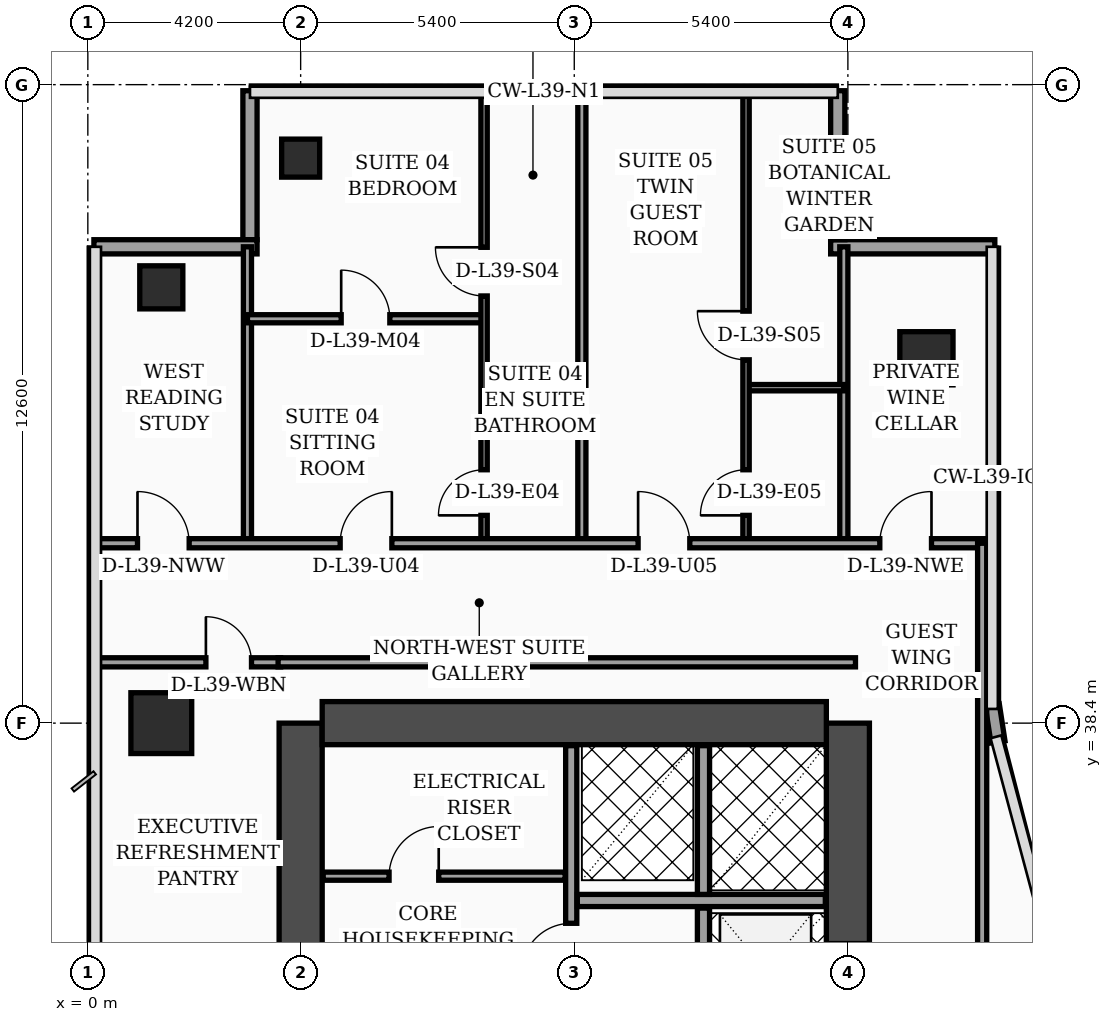
"""IFC4 building model, lengths in metres.
Left out: names, types, materials, properties, quantities, classifications, styles, units other than length and angle.
Written with IfcOpenShell. Run it as: python <this file> out.ifc"""

import sys

from ifc_helpers import new_model, si_unit, direction, frame, frame_2d, origin, origin_2d, place, context, subcontext, project, spatial, rectangle, hollow_rectangle, extrude, element, fill, save


model = new_model("IFC4")
c1 = context("Model", 3, precision=1e-05, world=origin(), true_north=direction((0.0, 1.0)))
c2 = subcontext(c1, "Body", "Model", "MODEL_VIEW")
j1 = project(units=[si_unit("LENGTHUNIT", "METRE"), si_unit("PLANEANGLEUNIT", "RADIAN")], contexts=[c1])
p1 = place(None, origin())
s1 = spatial("IfcSite", under=j1, at=p1, CompositionType="ELEMENT")
p2 = place(p1, origin())
s2 = spatial("IfcBuilding", under=s1, at=p2, CompositionType="ELEMENT")
p3 = place(p2, frame((0.0, 0.0, 159.9)))
s3 = spatial("IfcBuildingStorey", under=s2, at=p3, CompositionType="ELEMENT", Elevation=159.9)
p4 = place(p3, frame((4.2, 16.8, 0.0), z_axis=(0.0, 0.0, 1.0), x_axis=(0.0, 1.0, 0.0)))
e1 = element("IfcWall", 1, at=p4, inside=s3, PredefinedType="SHEAR", context=c2, shape_type="SweptSolid", body=[
    extrude(rectangle(XDim=21.6, YDim=0.85, at=frame_2d((10.8, 0.0))), origin(), (0.0, 0.0, 1.0), 3.56),
])
p5 = place(p3, frame((15.0, 16.8, 0.0), z_axis=(0.0, 0.0, 1.0), x_axis=(0.0, 1.0, 0.0)))
e2 = element("IfcWall", 2, at=p5, inside=s3, PredefinedType="SHEAR", context=c2, shape_type="SweptSolid", body=[
    extrude(rectangle(XDim=21.6, YDim=0.85, at=frame_2d((10.8, 0.0))), origin(), (0.0, 0.0, 1.0), 3.56),
])
p6 = place(p5, frame((8.65, 0.0, 0.0)))
e3 = element("IfcOpeningElement", 3, at=p6, cuts=e2, PredefinedType="OPENING", context=c2, shape_type="SweptSolid", body=[
    extrude(rectangle(XDim=1.1, YDim=2.2, at=frame_2d((0.55, 1.1))), frame((0.0, 0.435, 0.0), z_axis=(0.0, -1.0, 0.0), x_axis=(1.0, 0.0, 0.0)), (0.0, 0.0, 1.0), 0.87),
])
p7 = place(p5, frame((10.85, 0.0, 0.0)))
e4 = element("IfcOpeningElement", 4, at=p7, cuts=e2, PredefinedType="OPENING", context=c2, shape_type="SweptSolid", body=[
    extrude(rectangle(XDim=1.1, YDim=2.2, at=frame_2d((0.55, 1.1))), frame((0.0, 0.435, 0.0), z_axis=(0.0, -1.0, 0.0), x_axis=(1.0, 0.0, 0.0)), (0.0, 0.0, 1.0), 0.87),
])
p8 = place(p5, frame((13.5, 0.0, 0.0)))
e5 = element("IfcOpeningElement", 5, at=p8, cuts=e2, PredefinedType="OPENING", context=c2, shape_type="SweptSolid", body=[
    extrude(rectangle(XDim=1.1, YDim=2.2, at=frame_2d((0.55, 1.1))), frame((0.0, 0.435, 0.0), z_axis=(0.0, -1.0, 0.0), x_axis=(1.0, 0.0, 0.0)), (0.0, 0.0, 1.0), 0.87),
])
p9 = place(p5, frame((16.15, 0.0, 0.0)))
e6 = element("IfcOpeningElement", 6, at=p9, cuts=e2, PredefinedType="OPENING", context=c2, shape_type="SweptSolid", body=[
    extrude(rectangle(XDim=1.1, YDim=2.2, at=frame_2d((0.55, 1.1))), frame((0.0, 0.435, 0.0), z_axis=(0.0, -1.0, 0.0), x_axis=(1.0, 0.0, 0.0)), (0.0, 0.0, 1.0), 0.87),
])
p10 = place(p3, frame((4.625, 38.4, 0.0), z_axis=(0.0, 0.0, 1.0), x_axis=(1.0, 0.0, 0.0)))
e7 = element("IfcWall", 7, at=p10, inside=s3, PredefinedType="SHEAR", context=c2, shape_type="SweptSolid", body=[
    extrude(rectangle(XDim=9.95, YDim=0.85, at=frame_2d((4.975, 0.0))), origin(), (0.0, 0.0, 1.0), 3.56),
])
p11 = place(p3, frame((1.45, 38.4, 0.0), z_axis=(0.0, 0.0, 1.0), x_axis=(1.0, 0.0, 0.0)))
e8 = element("IfcColumn", 8, at=p11, inside=s3, PredefinedType="COLUMN", context=c2, shape_type="SweptSolid", body=[
    extrude(rectangle(XDim=1.2, YDim=1.2, at=origin_2d()), origin(), (0.0, 0.0, 1.0), 3.56),
])
p12 = place(p3, frame((1.45, 47.0, 0.0), z_axis=(0.0, 0.0, 1.0), x_axis=(1.0, 0.0, 0.0)))
e9 = element("IfcColumn", 9, at=p12, inside=s3, PredefinedType="COLUMN", context=c2, shape_type="SweptSolid", body=[
    extrude(hollow_rectangle(XDim=0.85, YDim=0.85, WallThickness=0.036, at=origin_2d()), origin(), (0.0, 0.0, 1.0), 3.56),
])
p13 = place(p3, frame((4.2, 49.55, 0.0), z_axis=(0.0, 0.0, 1.0), x_axis=(1.0, 0.0, 0.0)))
e10 = element("IfcColumn", 10, at=p13, inside=s3, PredefinedType="COLUMN", context=c2, shape_type="SweptSolid", body=[
    extrude(hollow_rectangle(XDim=0.75, YDim=0.75, WallThickness=0.032, at=origin_2d()), origin(), (0.0, 0.0, 1.0), 3.56),
])
p14 = place(p3, frame((16.55, 45.6, 0.0), z_axis=(0.0, 0.0, 1.0), x_axis=(1.0, 0.0, 0.0)))
e11 = element("IfcColumn", 11, at=p14, inside=s3, PredefinedType="COLUMN", context=c2, shape_type="SweptSolid", body=[
    extrude(rectangle(XDim=1.05, YDim=1.05, at=origin_2d()), origin(), (0.0, 0.0, 1.0), 3.56),
])
p15 = place(p3, frame((17.962, 38.03, 0.0), z_axis=(0.0, 0.0, 1.0), x_axis=(-0.15141125477, 0.988470855377, 0.0)))
e12 = element("IfcWall", 12, at=p15, inside=s3, PredefinedType="SOLIDWALL", context=c2, shape_type="SweptSolid", body=[
    extrude(rectangle(XDim=0.739, YDim=0.28, at=frame_2d((0.369, 0.0))), origin(), (0.0, 0.0, 1.0), 3.56),
])
p16 = place(p3, frame((17.9, 47.8, 0.0), z_axis=(0.0, 0.0, 1.0), x_axis=(-1.0, 0.0, 0.0)))
e13 = element("IfcWall", 13, at=p16, inside=s3, PredefinedType="SOLIDWALL", context=c2, shape_type="SweptSolid", body=[
    extrude(rectangle(XDim=3.24, YDim=0.28, at=frame_2d((1.62, 0.0))), origin(), (0.0, 0.0, 1.0), 3.56),
])
p17 = place(p3, frame((14.8, 47.94, 0.0), z_axis=(0.0, 0.0, 1.0), x_axis=(0.0, 1.0, 0.0)))
e14 = element("IfcWall", 14, at=p17, inside=s3, PredefinedType="SOLIDWALL", context=c2, shape_type="SweptSolid", body=[
    extrude(rectangle(XDim=2.94, YDim=0.28, at=frame_2d((1.47, 0.0))), origin(), (0.0, 0.0, 1.0), 3.56),
])
p18 = place(p3, frame((3.2, 50.88, 0.0), z_axis=(0.0, 0.0, 1.0), x_axis=(0.0, -1.0, 0.0)))
e15 = element("IfcWall", 15, at=p18, inside=s3, PredefinedType="SOLIDWALL", context=c2, shape_type="SweptSolid", body=[
    extrude(rectangle(XDim=2.94, YDim=0.28, at=frame_2d((1.47, 0.0))), origin(), (0.0, 0.0, 1.0), 3.04),
])
p19 = place(p3, frame((3.34, 47.8, 0.0), z_axis=(0.0, 0.0, 1.0), x_axis=(-1.0, 0.0, 0.0)))
e16 = element("IfcWall", 16, at=p19, inside=s3, PredefinedType="SOLIDWALL", context=c2, shape_type="SweptSolid", body=[
    extrude(rectangle(XDim=3.22, YDim=0.28, at=frame_2d((1.61, 0.0))), origin(), (0.0, 0.0, 1.0), 3.04),
])
p20 = place(p3, frame((4.645, 35.38, 0.0), z_axis=(0.0, 0.0, 1.0), x_axis=(1.0, 0.0, 0.0)))
e17 = element("IfcWall", 17, at=p20, inside=s3, PredefinedType="PARTITIONING", context=c2, shape_type="SweptSolid", body=[
    extrude(rectangle(XDim=4.775, YDim=0.16, at=frame_2d((2.387, 0.0))), origin(), (0.0, 0.0, 1.0), 3.56),
])
p21 = place(p20, frame((1.3, 0.0, 0.0)))
e18 = element("IfcOpeningElement", 18, at=p21, cuts=e17, PredefinedType="OPENING", context=c2, shape_type="SweptSolid", body=[
    extrude(rectangle(XDim=0.98, YDim=2.15, at=frame_2d((0.49, 1.075))), frame((0.0, 0.09, 0.0), z_axis=(0.0, -1.0, 0.0), x_axis=(1.0, 0.0, 0.0)), (0.0, 0.0, 1.0), 0.18),
])
p22 = place(p3, frame((9.54, 32.92, 0.0), z_axis=(0.0, 0.0, 1.0), x_axis=(0.0, 1.0, 0.0)))
e19 = element("IfcWall", 19, at=p22, inside=s3, PredefinedType="SOLIDWALL", context=c2, shape_type="SweptSolid", body=[
    extrude(rectangle(XDim=5.035, YDim=0.22, at=frame_2d((2.518, 0.0))), origin(), (0.0, 0.0, 1.0), 3.56),
])
p23 = place(p22, frame((0.55, 0.0, 0.0)))
e20 = element("IfcOpeningElement", 20, at=p23, cuts=e19, PredefinedType="OPENING", context=c2, shape_type="SweptSolid", body=[
    extrude(rectangle(XDim=0.98, YDim=2.15, at=frame_2d((0.49, 1.075))), frame((0.0, 0.12, 0.0), z_axis=(0.0, -1.0, 0.0), x_axis=(1.0, 0.0, 0.0)), (0.0, 0.0, 1.0), 0.24),
])
p24 = place(p3, frame((12.15, 27.0, 0.0), z_axis=(0.0, 0.0, 1.0), x_axis=(0.0, 1.0, 0.0)))
e21 = element("IfcWall", 21, at=p24, inside=s3, PredefinedType="SOLIDWALL", context=c2, shape_type="SweptSolid", body=[
    extrude(rectangle(XDim=7.75, YDim=0.24, at=frame_2d((3.875, 0.0))), origin(), (0.0, 0.0, 1.0), 3.56),
])
p25 = place(p3, frame((9.66, 34.9, 0.0), z_axis=(0.0, 0.0, 1.0), x_axis=(1.0, 0.0, 0.0)))
e22 = element("IfcWall", 22, at=p25, inside=s3, PredefinedType="SOLIDWALL", context=c2, shape_type="SweptSolid", body=[
    extrude(rectangle(XDim=4.895, YDim=0.24, at=frame_2d((2.448, 0.0))), origin(), (0.0, 0.0, 1.0), 3.56),
])
p26 = place(p3, frame((12.15, 35.02, 0.0), z_axis=(0.0, 0.0, 1.0), x_axis=(0.0, 1.0, 0.0)))
e23 = element("IfcWall", 23, at=p26, inside=s3, PredefinedType="SOLIDWALL", context=c2, shape_type="SweptSolid", body=[
    extrude(rectangle(XDim=2.935, YDim=0.24, at=frame_2d((1.468, 0.0))), origin(), (0.0, 0.0, 1.0), 3.56),
])
p27 = place(p3, frame((0.08, 39.6, 0.0), z_axis=(0.0, 0.0, 1.0), x_axis=(1.0, 0.0, 0.0)))
e24 = element("IfcWall", 24, at=p27, inside=s3, PredefinedType="PARTITIONING", context=c2, shape_type="SweptSolid", body=[
    extrude(rectangle(XDim=3.725, YDim=0.18, at=frame_2d((1.862, 0.0))), origin(), (0.0, 0.0, 1.0), 2.94),
])
p28 = place(p27, frame((2.25, 0.0, 0.0)))
e25 = element("IfcOpeningElement", 25, at=p28, cuts=e24, PredefinedType="OPENING", context=c2, shape_type="SweptSolid", body=[
    extrude(rectangle(XDim=0.9, YDim=2.15, at=frame_2d((0.45, 1.075))), frame((0.0, 0.1, 0.0), z_axis=(0.0, -1.0, 0.0), x_axis=(1.0, 0.0, 0.0)), (0.0, 0.0, 1.0), 0.2),
])
p29 = place(p3, frame((3.15, 41.95, 0.0), z_axis=(0.0, 0.0, 1.0), x_axis=(0.0, 1.0, 0.0)))
e26 = element("IfcWall", 26, at=p29, inside=s3, PredefinedType="PARTITIONING", context=c2, shape_type="SweptSolid", body=[
    extrude(rectangle(XDim=5.85, YDim=0.16, at=frame_2d((2.925, 0.0))), origin(), (0.0, 0.0, 1.0), 3.14),
])
p30 = place(p3, frame((14.92, 41.95, 0.0), z_axis=(0.0, 0.0, 1.0), x_axis=(0.0, 1.0, 0.0)))
e27 = element("IfcWall", 27, at=p30, inside=s3, PredefinedType="PARTITIONING", context=c2, shape_type="SweptSolid", body=[
    extrude(rectangle(XDim=5.85, YDim=0.16, at=frame_2d((2.925, 0.0))), origin(), (0.0, 0.0, 1.0), 3.04),
])
p31 = place(p3, frame((7.82, 45.02, 0.0), z_axis=(0.0, 0.0, 1.0), x_axis=(1.0, 0.0, 0.0)))
e28 = element("IfcWall", 28, at=p31, inside=s3, PredefinedType="PARTITIONING", context=c2, shape_type="SweptSolid", body=[
    extrude(rectangle(XDim=1.93, YDim=0.125, at=frame_2d((0.965, 0.0))), origin(), (0.0, 0.0, 1.0), 3.56),
])
p32 = place(p3, frame((3.15, 46.38, 0.0), z_axis=(0.0, 0.0, 1.0), x_axis=(1.0, 0.0, 0.0)))
e29 = element("IfcWall", 29, at=p32, inside=s3, PredefinedType="PARTITIONING", context=c2, shape_type="SweptSolid", body=[
    extrude(rectangle(XDim=4.67, YDim=0.16, at=frame_2d((2.335, 0.0))), origin(), (0.0, 0.0, 1.0), 2.94),
])
p33 = place(p32, frame((1.85, 0.0, 0.0)))
e30 = element("IfcOpeningElement", 30, at=p33, cuts=e29, PredefinedType="OPENING", context=c2, shape_type="SweptSolid", body=[
    extrude(rectangle(XDim=0.96, YDim=2.2, at=frame_2d((0.48, 1.1))), frame((0.0, 0.09, 0.0), z_axis=(0.0, -1.0, 0.0), x_axis=(1.0, 0.0, 0.0)), (0.0, 0.0, 1.0), 0.18),
])
p34 = place(p3, frame((7.82, 41.95, 0.0), z_axis=(0.0, 0.0, 1.0), x_axis=(0.0, 1.0, 0.0)))
e31 = element("IfcWall", 31, at=p34, inside=s3, PredefinedType="PARTITIONING", context=c2, shape_type="SweptSolid", body=[
    extrude(rectangle(XDim=8.99, YDim=0.125, at=frame_2d((4.495, 0.0))), origin(), (0.0, 0.0, 1.0), 3.04),
])
p35 = place(p34, frame((0.55, 0.0, 0.0)))
e32 = element("IfcOpeningElement", 32, at=p35, cuts=e31, PredefinedType="OPENING", context=c2, shape_type="SweptSolid", body=[
    extrude(rectangle(XDim=0.9, YDim=2.15, at=frame_2d((0.45, 1.075))), frame((0.0, 0.073, 0.0), z_axis=(0.0, -1.0, 0.0), x_axis=(1.0, 0.0, 0.0)), (0.0, 0.0, 1.0), 0.145),
])
p36 = place(p34, frame((4.88, 0.0, 0.0)))
e33 = element("IfcOpeningElement", 33, at=p36, cuts=e31, PredefinedType="OPENING", context=c2, shape_type="SweptSolid", body=[
    extrude(rectangle(XDim=0.96, YDim=2.2, at=frame_2d((0.48, 1.1))), frame((0.0, 0.073, 0.0), z_axis=(0.0, -1.0, 0.0), x_axis=(1.0, 0.0, 0.0)), (0.0, 0.0, 1.0), 0.145),
])
p37 = place(p3, frame((12.99, 45.02, 0.0), z_axis=(0.0, 0.0, 1.0), x_axis=(1.0, 0.0, 0.0)))
e34 = element("IfcWall", 34, at=p37, inside=s3, PredefinedType="PARTITIONING", context=c2, shape_type="SweptSolid", body=[
    extrude(rectangle(XDim=1.93, YDim=0.125, at=frame_2d((0.965, 0.0))), origin(), (0.0, 0.0, 1.0), 3.56),
])
p38 = place(p3, frame((12.99, 41.95, 0.0), z_axis=(0.0, 0.0, 1.0), x_axis=(0.0, 1.0, 0.0)))
e35 = element("IfcWall", 35, at=p38, inside=s3, PredefinedType="PARTITIONING", context=c2, shape_type="SweptSolid", body=[
    extrude(rectangle(XDim=8.99, YDim=0.125, at=frame_2d((4.495, 0.0))), origin(), (0.0, 0.0, 1.0), 3.04),
])
p39 = place(p38, frame((0.55, 0.0, 0.0)))
e36 = element("IfcOpeningElement", 36, at=p39, cuts=e35, PredefinedType="OPENING", context=c2, shape_type="SweptSolid", body=[
    extrude(rectangle(XDim=0.9, YDim=2.15, at=frame_2d((0.45, 1.075))), frame((0.0, 0.073, 0.0), z_axis=(0.0, -1.0, 0.0), x_axis=(1.0, 0.0, 0.0)), (0.0, 0.0, 1.0), 0.145),
])
p40 = place(p38, frame((3.62, 0.0, 0.0)))
e37 = element("IfcOpeningElement", 37, at=p40, cuts=e35, PredefinedType="OPENING", context=c2, shape_type="SweptSolid", body=[
    extrude(rectangle(XDim=0.96, YDim=2.2, at=frame_2d((0.48, 1.1))), frame((0.0, 0.073, 0.0), z_axis=(0.0, -1.0, 0.0), x_axis=(1.0, 0.0, 0.0)), (0.0, 0.0, 1.0), 0.145),
])
p41 = place(p3, frame((9.75, 41.95, 0.0), z_axis=(0.0, 0.0, 1.0), x_axis=(0.0, 1.0, 0.0)))
e38 = element("IfcWall", 38, at=p41, inside=s3, PredefinedType="PARTITIONING", context=c2, shape_type="SweptSolid", body=[
    extrude(rectangle(XDim=8.99, YDim=0.16, at=frame_2d((4.495, 0.0))), origin(), (0.0, 0.0, 1.0), 3.04),
])
p42 = place(p3, frame((0.08, 41.95, 0.0), z_axis=(0.0, 0.0, 1.0), x_axis=(1.0, 0.0, 0.0)))
e39 = element("IfcWall", 39, at=p42, inside=s3, PredefinedType="PARTITIONING", context=c2, shape_type="SweptSolid", body=[
    extrude(rectangle(XDim=17.77, YDim=0.18, at=frame_2d((8.885, 0.0))), origin(), (0.0, 0.0, 1.0), 2.94),
])
p43 = place(p42, frame((0.9, 0.0, 0.0)))
e40 = element("IfcOpeningElement", 40, at=p43, cuts=e39, PredefinedType="OPENING", context=c2, shape_type="SweptSolid", body=[
    extrude(rectangle(XDim=1.02, YDim=2.2, at=frame_2d((0.51, 1.1))), frame((0.0, 0.1, 0.0), z_axis=(0.0, -1.0, 0.0), x_axis=(1.0, 0.0, 0.0)), (0.0, 0.0, 1.0), 0.2),
])
p44 = place(p42, frame((4.9, 0.0, 0.0)))
e41 = element("IfcOpeningElement", 41, at=p44, cuts=e39, PredefinedType="OPENING", context=c2, shape_type="SweptSolid", body=[
    extrude(rectangle(XDim=1.02, YDim=2.2, at=frame_2d((0.51, 1.1))), frame((0.0, 0.1, 0.0), z_axis=(0.0, -1.0, 0.0), x_axis=(1.0, 0.0, 0.0)), (0.0, 0.0, 1.0), 0.2),
])
p45 = place(p42, frame((10.78, 0.0, 0.0)))
e42 = element("IfcOpeningElement", 42, at=p45, cuts=e39, PredefinedType="OPENING", context=c2, shape_type="SweptSolid", body=[
    extrude(rectangle(XDim=1.02, YDim=2.2, at=frame_2d((0.51, 1.1))), frame((0.0, 0.1, 0.0), z_axis=(0.0, -1.0, 0.0), x_axis=(1.0, 0.0, 0.0)), (0.0, 0.0, 1.0), 0.2),
])
p46 = place(p42, frame((15.55, 0.0, 0.0)))
e43 = element("IfcOpeningElement", 43, at=p46, cuts=e39, PredefinedType="OPENING", context=c2, shape_type="SweptSolid", body=[
    extrude(rectangle(XDim=1.02, YDim=2.2, at=frame_2d((0.51, 1.1))), frame((0.0, 0.1, 0.0), z_axis=(0.0, -1.0, 0.0), x_axis=(1.0, 0.0, 0.0)), (0.0, 0.0, 1.0), 0.2),
])
p47 = place(p3, frame((17.65, 24.3, 0.0), z_axis=(0.0, 0.0, 1.0), x_axis=(0.0, 1.0, 0.0)))
e44 = element("IfcWall", 44, at=p47, inside=s3, PredefinedType="PARTITIONING", context=c2, shape_type="SweptSolid", body=[
    extrude(rectangle(XDim=17.65, YDim=0.18, at=frame_2d((8.825, 0.0))), origin(), (0.0, 0.0, 1.0), 2.94),
])
p48 = place(p3, frame((3.755, 39.6, 0.0), z_axis=(0.0, 0.0, 1.0), x_axis=(1.0, 0.0, 0.0)))
e45 = element("IfcWall", 45, at=p48, inside=s3, PredefinedType="PARTITIONING", context=c2, shape_type="SweptSolid", body=[
    extrude(rectangle(XDim=11.395, YDim=0.18, at=frame_2d((5.698, 0.0))), origin(), (0.0, 0.0, 1.0), 2.94),
])
p49 = place(p21, origin())
e46 = element("IfcDoor", 46, at=p49, inside=s3, OperationType="SINGLE_SWING_RIGHT", PredefinedType="DOOR", context=c2, shape_type="SweptSolid", body=[
    extrude(rectangle(XDim=0.98, YDim=2.15, at=frame_2d((0.49, 1.075))), frame((0.0, 0.025, 0.0), z_axis=(0.0, -1.0, 0.0), x_axis=(1.0, 0.0, 0.0)), (0.0, 0.0, 1.0), 0.05),
])
fill(e18, e46)
p50 = place(p23, origin())
e47 = element("IfcDoor", 47, at=p50, inside=s3, OperationType="SINGLE_SWING_LEFT", PredefinedType="DOOR", context=c2, shape_type="SweptSolid", body=[
    extrude(rectangle(XDim=0.98, YDim=2.15, at=frame_2d((0.49, 1.075))), frame((0.0, 0.025, 0.0), z_axis=(0.0, -1.0, 0.0), x_axis=(1.0, 0.0, 0.0)), (0.0, 0.0, 1.0), 0.05),
])
fill(e20, e47)
p51 = place(p28, origin())
e48 = element("IfcDoor", 48, at=p51, inside=s3, OperationType="SINGLE_SWING_LEFT", PredefinedType="DOOR", context=c2, shape_type="SweptSolid", body=[
    extrude(rectangle(XDim=0.9, YDim=2.15, at=frame_2d((0.45, 1.075))), frame((0.0, 0.025, 0.0), z_axis=(0.0, -1.0, 0.0), x_axis=(1.0, 0.0, 0.0)), (0.0, 0.0, 1.0), 0.05),
])
fill(e25, e48)
p52 = place(p33, origin())
e49 = element("IfcDoor", 49, at=p52, inside=s3, OperationType="SINGLE_SWING_LEFT", PredefinedType="DOOR", context=c2, shape_type="SweptSolid", body=[
    extrude(rectangle(XDim=0.96, YDim=2.2, at=frame_2d((0.48, 1.1))), frame((0.0, 0.025, 0.0), z_axis=(0.0, -1.0, 0.0), x_axis=(1.0, 0.0, 0.0)), (0.0, 0.0, 1.0), 0.05),
])
fill(e30, e49)
p53 = place(p35, origin())
e50 = element("IfcDoor", 50, at=p53, inside=s3, OperationType="SINGLE_SWING_LEFT", PredefinedType="DOOR", context=c2, shape_type="SweptSolid", body=[
    extrude(rectangle(XDim=0.9, YDim=2.15, at=frame_2d((0.45, 1.075))), frame((0.0, 0.025, 0.0), z_axis=(0.0, -1.0, 0.0), x_axis=(1.0, 0.0, 0.0)), (0.0, 0.0, 1.0), 0.05),
])
fill(e32, e50)
p54 = place(p36, origin())
e51 = element("IfcDoor", 51, at=p54, inside=s3, OperationType="SINGLE_SWING_RIGHT", PredefinedType="DOOR", context=c2, shape_type="SweptSolid", body=[
    extrude(rectangle(XDim=0.96, YDim=2.2, at=frame_2d((0.48, 1.1))), frame((0.0, 0.025, 0.0), z_axis=(0.0, -1.0, 0.0), x_axis=(1.0, 0.0, 0.0)), (0.0, 0.0, 1.0), 0.05),
])
fill(e33, e51)
p55 = place(p39, origin())
e52 = element("IfcDoor", 52, at=p55, inside=s3, OperationType="SINGLE_SWING_LEFT", PredefinedType="DOOR", context=c2, shape_type="SweptSolid", body=[
    extrude(rectangle(XDim=0.9, YDim=2.15, at=frame_2d((0.45, 1.075))), frame((0.0, 0.025, 0.0), z_axis=(0.0, -1.0, 0.0), x_axis=(1.0, 0.0, 0.0)), (0.0, 0.0, 1.0), 0.05),
])
fill(e36, e52)
p56 = place(p40, origin())
e53 = element("IfcDoor", 53, at=p56, inside=s3, OperationType="SINGLE_SWING_RIGHT", PredefinedType="DOOR", context=c2, shape_type="SweptSolid", body=[
    extrude(rectangle(XDim=0.96, YDim=2.2, at=frame_2d((0.48, 1.1))), frame((0.0, 0.025, 0.0), z_axis=(0.0, -1.0, 0.0), x_axis=(1.0, 0.0, 0.0)), (0.0, 0.0, 1.0), 0.05),
])
fill(e37, e53)
p57 = place(p43, origin())
e54 = element("IfcDoor", 54, at=p57, inside=s3, OperationType="SINGLE_SWING_LEFT", PredefinedType="DOOR", context=c2, shape_type="SweptSolid", body=[
    extrude(rectangle(XDim=1.02, YDim=2.2, at=frame_2d((0.51, 1.1))), frame((0.0, 0.025, 0.0), z_axis=(0.0, -1.0, 0.0), x_axis=(1.0, 0.0, 0.0)), (0.0, 0.0, 1.0), 0.05),
])
fill(e40, e54)
p58 = place(p44, origin())
e55 = element("IfcDoor", 55, at=p58, inside=s3, OperationType="SINGLE_SWING_RIGHT", PredefinedType="DOOR", context=c2, shape_type="SweptSolid", body=[
    extrude(rectangle(XDim=1.02, YDim=2.2, at=frame_2d((0.51, 1.1))), frame((0.0, 0.025, 0.0), z_axis=(0.0, -1.0, 0.0), x_axis=(1.0, 0.0, 0.0)), (0.0, 0.0, 1.0), 0.05),
])
fill(e41, e55)
p59 = place(p45, origin())
e56 = element("IfcDoor", 56, at=p59, inside=s3, OperationType="SINGLE_SWING_LEFT", PredefinedType="DOOR", context=c2, shape_type="SweptSolid", body=[
    extrude(rectangle(XDim=1.02, YDim=2.2, at=frame_2d((0.51, 1.1))), frame((0.0, 0.025, 0.0), z_axis=(0.0, -1.0, 0.0), x_axis=(1.0, 0.0, 0.0)), (0.0, 0.0, 1.0), 0.05),
])
fill(e42, e56)
p60 = place(p46, origin())
e57 = element("IfcDoor", 57, at=p60, inside=s3, OperationType="SINGLE_SWING_RIGHT", PredefinedType="DOOR", context=c2, shape_type="SweptSolid", body=[
    extrude(rectangle(XDim=1.02, YDim=2.2, at=frame_2d((0.51, 1.1))), frame((0.0, 0.025, 0.0), z_axis=(0.0, -1.0, 0.0), x_axis=(1.0, 0.0, 0.0)), (0.0, 0.0, 1.0), 0.05),
])
fill(e43, e57)
save(model, sys.argv[1])
